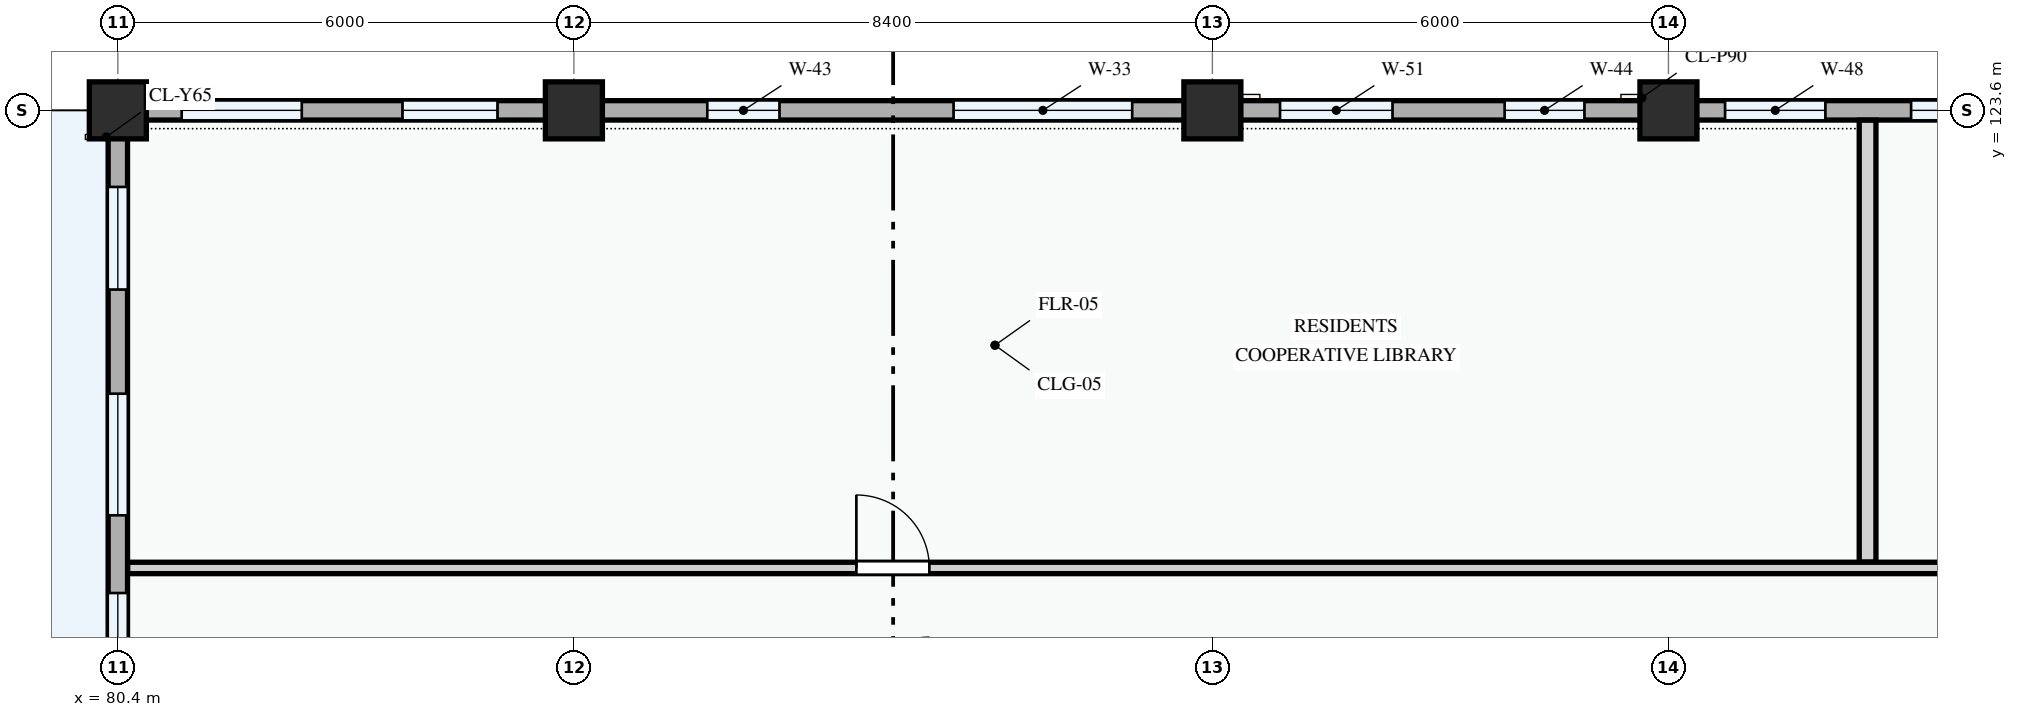
"""IFC4 building model, lengths in metres.
Left out: names, types, materials, properties, quantities, classifications, styles, units other than length and angle.
Written with IfcOpenShell. Run it as: python <this file> out.ifc"""

import sys

from ifc_helpers import new_model, si_unit, direction, frame, frame_2d, origin, origin_2d, place, context, subcontext, project, spatial, rectangle, extrude, element, fill, save


model = new_model("IFC4")
c1 = context("Model", 3, precision=1e-05, world=origin(), true_north=direction((0.0, 1.0)))
c2 = subcontext(c1, "Body", "Model", "MODEL_VIEW")
j1 = project(units=[si_unit("LENGTHUNIT", "METRE"), si_unit("PLANEANGLEUNIT", "RADIAN")], contexts=[c1])
p1 = place(None, origin())
s1 = spatial("IfcSite", under=j1, at=p1, CompositionType="ELEMENT")
p2 = place(p1, origin())
s2 = spatial("IfcBuilding", under=s1, at=p2, CompositionType="ELEMENT")
p3 = place(p2, origin())
s3 = spatial("IfcBuildingStorey", under=s2, at=p3, CompositionType="ELEMENT", Elevation=0.0)
for number, where, z_axis, x_axis in (
    (1, (80.4, 123.6, 0.0), (0.0, 0.0, 1.0), (1.0, 0.0, 0.0)),
    (2, (86.4, 123.6, 0.0), (0.0, 0.0, 1.0), (1.0, 0.0, 0.0)),
    (3, (94.8, 123.6, 0.0), (0.0, 0.0, 1.0), (1.0, 0.0, 0.0)),
    (4, (100.8, 123.6, 0.0), (0.0, 0.0, 1.0), (1.0, 0.0, 0.0)),
):
    element("IfcColumn", number, at=place(p3, frame(where, z_axis=z_axis, x_axis=x_axis)), inside=s3, PredefinedType="COLUMN", context=c2, shape_type="SweptSolid", body=[
        extrude(rectangle(XDim=0.75, YDim=0.75, at=origin_2d()), origin(), (0.0, 0.0, 1.0), 4.5),
    ])
p4 = place(p3, frame((109.2, 123.6, 0.0), z_axis=(0.0, 0.0, 1.0), x_axis=(-1.0, 0.0, 0.0)))
e5 = element("IfcWall", 5, at=p4, inside=s3, PredefinedType="STANDARD", context=c2, shape_type="SweptSolid", body=[
    extrude(rectangle(XDim=8.4, YDim=0.255, at=frame_2d((4.2, 0.0))), origin(), (0.0, 0.0, 1.0), 3.485),
])
p5 = place(p4, frame((0.933, 0.0, 0.78)))
e6 = element("IfcOpeningElement", 6, at=p5, cuts=e5, PredefinedType="OPENING", context=c2, shape_type="SweptSolid", body=[
    extrude(rectangle(XDim=1.38, YDim=1.48, at=frame_2d((0.69, 0.74))), frame((0.0, 0.137, 0.0), z_axis=(0.0, -1.0, 0.0), x_axis=(1.0, 0.0, 0.0)), (0.0, 0.0, 1.0), 0.275),
])
p6 = place(p4, frame((3.488, 0.0, 0.78)))
e7 = element("IfcOpeningElement", 7, at=p6, cuts=e5, PredefinedType="OPENING", context=c2, shape_type="SweptSolid", body=[
    extrude(rectangle(XDim=1.72, YDim=1.52, at=frame_2d((0.86, 0.76))), frame((0.0, 0.137, 0.0), z_axis=(0.0, -1.0, 0.0), x_axis=(1.0, 0.0, 0.0)), (0.0, 0.0, 1.0), 0.275),
])
p7 = place(p4, frame((6.335, 0.0, 0.78)))
e8 = element("IfcOpeningElement", 8, at=p7, cuts=e5, PredefinedType="OPENING", context=c2, shape_type="SweptSolid", body=[
    extrude(rectangle(XDim=1.32, YDim=1.35, at=frame_2d((0.66, 0.675))), frame((0.0, 0.137, 0.0), z_axis=(0.0, -1.0, 0.0), x_axis=(1.0, 0.0, 0.0)), (0.0, 0.0, 1.0), 0.275),
])
p8 = place(p3, frame((100.8, 123.6, 0.0), z_axis=(0.0, 0.0, 1.0), x_axis=(-1.0, 0.0, 0.0)))
e9 = element("IfcWall", 9, at=p8, inside=s3, PredefinedType="STANDARD", context=c2, shape_type="SweptSolid", body=[
    extrude(rectangle(XDim=6.0, YDim=0.255, at=frame_2d((3.0, 0.0))), origin(), (0.0, 0.0, 1.0), 3.585),
])
p9 = place(p8, frame((1.105, 0.0, 0.78)))
e10 = element("IfcOpeningElement", 10, at=p9, cuts=e9, PredefinedType="OPENING", context=c2, shape_type="SweptSolid", body=[
    extrude(rectangle(XDim=1.05, YDim=1.2, at=frame_2d((0.525, 0.6))), frame((0.0, 0.137, 0.0), z_axis=(0.0, -1.0, 0.0), x_axis=(1.0, 0.0, 0.0)), (0.0, 0.0, 1.0), 0.275),
])
p10 = place(p8, frame((3.63, 0.0, 0.78)))
e11 = element("IfcOpeningElement", 11, at=p10, cuts=e9, PredefinedType="OPENING", context=c2, shape_type="SweptSolid", body=[
    extrude(rectangle(XDim=1.48, YDim=1.52, at=frame_2d((0.74, 0.76))), frame((0.0, 0.137, 0.0), z_axis=(0.0, -1.0, 0.0), x_axis=(1.0, 0.0, 0.0)), (0.0, 0.0, 1.0), 0.275),
])
p11 = place(p3, frame((94.8, 123.6, 0.0), z_axis=(0.0, 0.0, 1.0), x_axis=(-1.0, 0.0, 0.0)))
e12 = element("IfcWall", 12, at=p11, inside=s3, PredefinedType="STANDARD", context=c2, shape_type="SweptSolid", body=[
    extrude(rectangle(XDim=8.4, YDim=0.255, at=frame_2d((4.2, 0.0))), origin(), (0.0, 0.0, 1.0), 3.485),
])
p12 = place(p11, frame((1.055, 0.0, 0.78)))
e13 = element("IfcOpeningElement", 13, at=p12, cuts=e12, PredefinedType="OPENING", context=c2, shape_type="SweptSolid", body=[
    extrude(rectangle(XDim=2.35, YDim=1.55, at=frame_2d((1.175, 0.775))), frame((0.0, 0.137, 0.0), z_axis=(0.0, -1.0, 0.0), x_axis=(1.0, 0.0, 0.0)), (0.0, 0.0, 1.0), 0.275),
])
p13 = place(p11, frame((5.695, 0.0, 0.78)))
e14 = element("IfcOpeningElement", 14, at=p13, cuts=e12, PredefinedType="OPENING", context=c2, shape_type="SweptSolid", body=[
    extrude(rectangle(XDim=0.95, YDim=1.15, at=frame_2d((0.475, 0.575))), frame((0.0, 0.137, 0.0), z_axis=(0.0, -1.0, 0.0), x_axis=(1.0, 0.0, 0.0)), (0.0, 0.0, 1.0), 0.275),
])
p14 = place(p3, frame((86.4, 123.6, 0.0), z_axis=(0.0, 0.0, 1.0), x_axis=(-1.0, 0.0, 0.0)))
e15 = element("IfcWall", 15, at=p14, inside=s3, PredefinedType="STANDARD", context=c2, shape_type="SweptSolid", body=[
    extrude(rectangle(XDim=6.0, YDim=0.255, at=frame_2d((3.0, 0.0))), origin(), (0.0, 0.0, 1.0), 3.585),
])
p15 = place(p14, frame((1.005, 0.0, 0.78)))
e16 = element("IfcOpeningElement", 16, at=p15, cuts=e15, PredefinedType="OPENING", context=c2, shape_type="SweptSolid", body=[
    extrude(rectangle(XDim=1.25, YDim=1.3, at=frame_2d((0.625, 0.65))), frame((0.0, 0.137, 0.0), z_axis=(0.0, -1.0, 0.0), x_axis=(1.0, 0.0, 0.0)), (0.0, 0.0, 1.0), 0.275),
])
p16 = place(p14, frame((3.58, 0.0, 0.78)))
e17 = element("IfcOpeningElement", 17, at=p16, cuts=e15, PredefinedType="OPENING", context=c2, shape_type="SweptSolid", body=[
    extrude(rectangle(XDim=1.58, YDim=1.48, at=frame_2d((0.79, 0.74))), frame((0.0, 0.137, 0.0), z_axis=(0.0, -1.0, 0.0), x_axis=(1.0, 0.0, 0.0)), (0.0, 0.0, 1.0), 0.275),
])
p17 = place(p3, frame((80.4, 123.6, 0.0), z_axis=(0.0, 0.0, 1.0), x_axis=(0.0, -1.0, 0.0)))
e18 = element("IfcWall", 18, at=p17, inside=s3, PredefinedType="STANDARD", context=c2, shape_type="SweptSolid", body=[
    extrude(rectangle(XDim=8.4, YDim=0.255, at=frame_2d((4.2, 0.0))), origin(), (0.0, 0.0, 1.0), 3.485),
])
p18 = place(p17, frame((1.008, 0.0, 0.78)))
e19 = element("IfcOpeningElement", 19, at=p18, cuts=e18, PredefinedType="OPENING", context=c2, shape_type="SweptSolid", body=[
    extrude(rectangle(XDim=1.35, YDim=1.55, at=frame_2d((0.675, 0.775))), frame((0.0, 0.137, 0.0), z_axis=(0.0, -1.0, 0.0), x_axis=(1.0, 0.0, 0.0)), (0.0, 0.0, 1.0), 0.275),
])
p19 = place(p17, frame((3.728, 0.0, 0.78)))
e20 = element("IfcOpeningElement", 20, at=p19, cuts=e18, PredefinedType="OPENING", context=c2, shape_type="SweptSolid", body=[
    extrude(rectangle(XDim=1.6, YDim=1.75, at=frame_2d((0.8, 0.875))), frame((0.0, 0.137, 0.0), z_axis=(0.0, -1.0, 0.0), x_axis=(1.0, 0.0, 0.0)), (0.0, 0.0, 1.0), 0.275),
])
p20 = place(p17, frame((6.35, 0.0, 0.78)))
e21 = element("IfcOpeningElement", 21, at=p20, cuts=e18, PredefinedType="OPENING", context=c2, shape_type="SweptSolid", body=[
    extrude(rectangle(XDim=1.2, YDim=1.5, at=frame_2d((0.6, 0.75))), frame((0.0, 0.137, 0.0), z_axis=(0.0, -1.0, 0.0), x_axis=(1.0, 0.0, 0.0)), (0.0, 0.0, 1.0), 0.275),
])
p21 = place(p3, frame((103.42, 117.657, 0.0), z_axis=(0.0, 0.0, 1.0), x_axis=(0.0, 1.0, 0.0)))
e22 = element("IfcWall", 22, at=p21, inside=s3, PredefinedType="PARTITIONING", context=c2, shape_type="SweptSolid", body=[
    extrude(rectangle(XDim=5.813, YDim=0.22, at=frame_2d((2.907, 0.0))), origin(), (0.0, 0.0, 1.0), 4.2),
])
p22 = place(p3, frame((80.53, 117.58, 0.0), z_axis=(0.0, 0.0, 1.0), x_axis=(1.0, 0.0, 0.0)))
e23 = element("IfcWall", 23, at=p22, inside=s3, PredefinedType="PARTITIONING", context=c2, shape_type="SweptSolid", body=[
    extrude(rectangle(XDim=72.01, YDim=0.15, at=frame_2d((36.005, 0.0))), origin(), (0.0, 0.0, 1.0), 4.2),
])
p23 = place(p22, frame((9.587, 0.0, 0.0)))
e24 = element("IfcOpeningElement", 24, at=p23, cuts=e23, PredefinedType="OPENING", context=c2, shape_type="SweptSolid", body=[
    extrude(rectangle(XDim=0.96, YDim=2.12, at=frame_2d((0.48, 1.06))), frame((0.0, 0.085, 0.0), z_axis=(0.0, -1.0, 0.0), x_axis=(1.0, 0.0, 0.0)), (0.0, 0.0, 1.0), 0.17),
])
p24 = place(p22, frame((38.41, 0.0, 0.0)))
e25 = element("IfcOpeningElement", 25, at=p24, cuts=e23, PredefinedType="OPENING", context=c2, shape_type="SweptSolid", body=[
    extrude(rectangle(XDim=0.92, YDim=2.1, at=frame_2d((0.46, 1.05))), frame((0.0, 0.085, 0.0), z_axis=(0.0, -1.0, 0.0), x_axis=(1.0, 0.0, 0.0)), (0.0, 0.0, 1.0), 0.17),
])
p25 = place(p22, frame((52.857, 0.0, 0.0)))
e26 = element("IfcOpeningElement", 26, at=p25, cuts=e23, PredefinedType="OPENING", context=c2, shape_type="SweptSolid", body=[
    extrude(rectangle(XDim=0.92, YDim=2.1, at=frame_2d((0.46, 1.05))), frame((0.0, 0.085, 0.0), z_axis=(0.0, -1.0, 0.0), x_axis=(1.0, 0.0, 0.0)), (0.0, 0.0, 1.0), 0.17),
])
p26 = place(p6, origin())
e27 = element("IfcWindow", 27, at=p26, inside=s3, PartitioningType="DOUBLE_PANEL_VERTICAL", PredefinedType="WINDOW", context=c2, shape_type="SweptSolid", body=[
    extrude(rectangle(XDim=1.72, YDim=1.52, at=frame_2d((0.86, 0.76))), frame((0.0, 0.03, 0.0), z_axis=(0.0, -1.0, 0.0), x_axis=(1.0, 0.0, 0.0)), (0.0, 0.0, 1.0), 0.06),
])
fill(e7, e27)
p27 = place(p7, origin())
e28 = element("IfcWindow", 28, at=p27, inside=s3, PartitioningType="SINGLE_PANEL", PredefinedType="WINDOW", context=c2, shape_type="SweptSolid", body=[
    extrude(rectangle(XDim=1.32, YDim=1.35, at=frame_2d((0.66, 0.675))), frame((0.0, 0.03, 0.0), z_axis=(0.0, -1.0, 0.0), x_axis=(1.0, 0.0, 0.0)), (0.0, 0.0, 1.0), 0.06),
])
fill(e8, e28)
p28 = place(p9, origin())
e29 = element("IfcWindow", 29, at=p28, inside=s3, PartitioningType="SINGLE_PANEL", PredefinedType="WINDOW", context=c2, shape_type="SweptSolid", body=[
    extrude(rectangle(XDim=1.05, YDim=1.2, at=frame_2d((0.525, 0.6))), frame((0.0, 0.03, 0.0), z_axis=(0.0, -1.0, 0.0), x_axis=(1.0, 0.0, 0.0)), (0.0, 0.0, 1.0), 0.06),
])
fill(e10, e29)
p29 = place(p10, origin())
e30 = element("IfcWindow", 30, at=p29, inside=s3, PartitioningType="SINGLE_PANEL", PredefinedType="WINDOW", context=c2, shape_type="SweptSolid", body=[
    extrude(rectangle(XDim=1.48, YDim=1.52, at=frame_2d((0.74, 0.76))), frame((0.0, 0.03, 0.0), z_axis=(0.0, -1.0, 0.0), x_axis=(1.0, 0.0, 0.0)), (0.0, 0.0, 1.0), 0.06),
])
fill(e11, e30)
p30 = place(p12, origin())
e31 = element("IfcWindow", 31, at=p30, inside=s3, PartitioningType="DOUBLE_PANEL_VERTICAL", PredefinedType="WINDOW", context=c2, shape_type="SweptSolid", body=[
    extrude(rectangle(XDim=2.35, YDim=1.55, at=frame_2d((1.175, 0.775))), frame((0.0, 0.03, 0.0), z_axis=(0.0, -1.0, 0.0), x_axis=(1.0, 0.0, 0.0)), (0.0, 0.0, 1.0), 0.06),
])
fill(e13, e31)
p31 = place(p13, origin())
e32 = element("IfcWindow", 32, at=p31, inside=s3, PartitioningType="SINGLE_PANEL", PredefinedType="WINDOW", context=c2, shape_type="SweptSolid", body=[
    extrude(rectangle(XDim=0.95, YDim=1.15, at=frame_2d((0.475, 0.575))), frame((0.0, 0.03, 0.0), z_axis=(0.0, -1.0, 0.0), x_axis=(1.0, 0.0, 0.0)), (0.0, 0.0, 1.0), 0.06),
])
fill(e14, e32)
p32 = place(p15, origin())
e33 = element("IfcWindow", 33, at=p32, inside=s3, PartitioningType="SINGLE_PANEL", PredefinedType="WINDOW", context=c2, shape_type="SweptSolid", body=[
    extrude(rectangle(XDim=1.25, YDim=1.3, at=frame_2d((0.625, 0.65))), frame((0.0, 0.03, 0.0), z_axis=(0.0, -1.0, 0.0), x_axis=(1.0, 0.0, 0.0)), (0.0, 0.0, 1.0), 0.06),
])
fill(e16, e33)
p33 = place(p16, origin())
e34 = element("IfcWindow", 34, at=p33, inside=s3, PartitioningType="SINGLE_PANEL", PredefinedType="WINDOW", context=c2, shape_type="SweptSolid", body=[
    extrude(rectangle(XDim=1.58, YDim=1.48, at=frame_2d((0.79, 0.74))), frame((0.0, 0.03, 0.0), z_axis=(0.0, -1.0, 0.0), x_axis=(1.0, 0.0, 0.0)), (0.0, 0.0, 1.0), 0.06),
])
fill(e17, e34)
p34 = place(p18, origin())
e35 = element("IfcWindow", 35, at=p34, inside=s3, PartitioningType="SINGLE_PANEL", PredefinedType="WINDOW", context=c2, shape_type="SweptSolid", body=[
    extrude(rectangle(XDim=1.35, YDim=1.55, at=frame_2d((0.675, 0.775))), frame((0.0, 0.03, 0.0), z_axis=(0.0, -1.0, 0.0), x_axis=(1.0, 0.0, 0.0)), (0.0, 0.0, 1.0), 0.06),
])
fill(e19, e35)
p35 = place(p19, origin())
e36 = element("IfcWindow", 36, at=p35, inside=s3, PartitioningType="DOUBLE_PANEL_VERTICAL", PredefinedType="WINDOW", context=c2, shape_type="SweptSolid", body=[
    extrude(rectangle(XDim=1.6, YDim=1.75, at=frame_2d((0.8, 0.875))), frame((0.0, 0.03, 0.0), z_axis=(0.0, -1.0, 0.0), x_axis=(1.0, 0.0, 0.0)), (0.0, 0.0, 1.0), 0.06),
])
fill(e20, e36)
p36 = place(p20, origin())
e37 = element("IfcWindow", 37, at=p36, inside=s3, PartitioningType="SINGLE_PANEL", PredefinedType="WINDOW", context=c2, shape_type="SweptSolid", body=[
    extrude(rectangle(XDim=1.2, YDim=1.5, at=frame_2d((0.6, 0.75))), frame((0.0, 0.03, 0.0), z_axis=(0.0, -1.0, 0.0), x_axis=(1.0, 0.0, 0.0)), (0.0, 0.0, 1.0), 0.06),
])
fill(e21, e37)
p37 = place(p23, origin())
e38 = element("IfcDoor", 38, at=p37, inside=s3, OperationType="SINGLE_SWING_LEFT", PredefinedType="DOOR", context=c2, shape_type="SweptSolid", body=[
    extrude(rectangle(XDim=0.96, YDim=2.12, at=frame_2d((0.48, 1.06))), frame((0.0, 0.025, 0.0), z_axis=(0.0, -1.0, 0.0), x_axis=(1.0, 0.0, 0.0)), (0.0, 0.0, 1.0), 0.05),
])
fill(e24, e38)
save(model, sys.argv[1])
